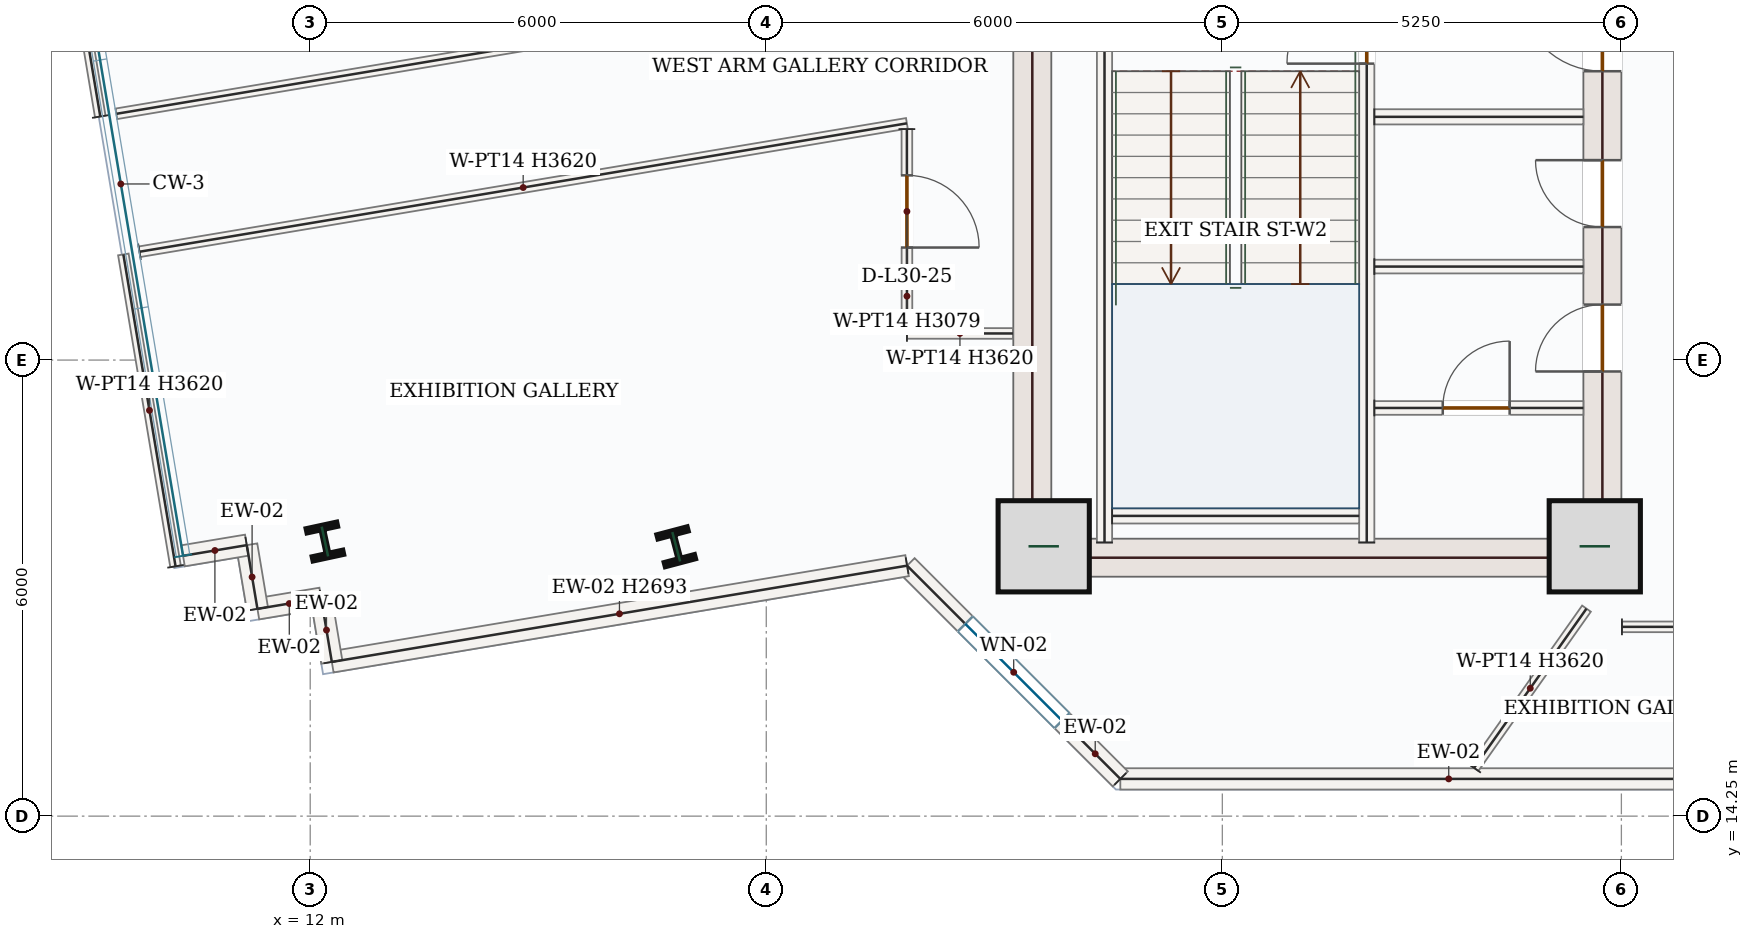
"""IFC4 building model, lengths in metres.
Left out: names, types, materials, properties, quantities, classifications, styles, units other than length and angle.
Written with IfcOpenShell. Run it as: python <this file> out.ifc"""

import sys

from ifc_helpers import new_model, si_unit, direction, frame, frame_2d, origin, origin_2d, place, context, subcontext, project, spatial, rectangle, i_section, extrude, source, transform, mapped, element, fill, save


model = new_model("IFC4")
c1 = context("Model", 3, precision=1e-05, world=origin(), true_north=direction((0.0, 1.0)))
c2 = subcontext(c1, "Body", "Model", "MODEL_VIEW")
j1 = project(units=[si_unit("LENGTHUNIT", "METRE"), si_unit("PLANEANGLEUNIT", "RADIAN")], contexts=[c1])
p1 = place(None, origin())
s1 = spatial("IfcSite", under=j1, at=p1, CompositionType="ELEMENT")
p2 = place(p1, origin())
s2 = spatial("IfcBuilding", under=s1, at=p2, CompositionType="ELEMENT")
p3 = place(p2, frame((0.0, 0.0, 135.6)))
s3 = spatial("IfcBuildingStorey", under=s2, at=p3, CompositionType="ELEMENT", Elevation=135.6)
m1 = source(origin(), c2, "Body", "SweptSolid", [
    extrude(rectangle(XDim=8.55, YDim=0.5, at=frame_2d((4.275, 0.0))), origin(), (0.0, 0.0, 1.0), 3.62),
])
p4 = place(p3, frame((21.5, 17.4, 0.0), z_axis=(0.0, 0.0, 1.0), x_axis=(0.0, 1.0, 0.0)))
e1 = element("IfcWall", 1, at=p4, inside=s3, PredefinedType="SHEAR", context=c2, shape_type="MappedRepresentation", body=[
    mapped(m1, transform((0.0, 0.0, 0.0), x_axis=(1.0, 0.0, 0.0), y_axis=(0.0, 1.0, 0.0), z_axis=(0.0, 0.0, 1.0), scale=1.0)),
])
p5 = place(p3, frame((29.0, 17.4, 0.0), z_axis=(0.0, 0.0, 1.0), x_axis=(0.0, 1.0, 0.0)))
e2 = element("IfcWall", 2, at=p5, inside=s3, PredefinedType="SHEAR", context=c2, shape_type="SweptSolid", body=[
    extrude(rectangle(XDim=8.55, YDim=0.5, at=frame_2d((4.275, 0.0))), origin(), (0.0, 0.0, 1.0), 3.62),
])
p6 = place(p5, frame((6.65, 0.0, 0.0)))
e3 = element("IfcOpeningElement", 3, at=p6, cuts=e2, PredefinedType="OPENING", context=c2, shape_type="SweptSolid", body=[
    extrude(rectangle(XDim=1.1, YDim=2.2, at=frame_2d((0.55, 1.1))), frame((0.0, 0.26, 0.0), z_axis=(0.0, -1.0, 0.0), x_axis=(1.0, 0.0, 0.0)), (0.0, 0.0, 1.0), 0.52),
])
p7 = place(p5, frame((2.7, 0.0, 0.0)))
e4 = element("IfcOpeningElement", 4, at=p7, cuts=e2, PredefinedType="OPENING", context=c2, shape_type="SweptSolid", body=[
    extrude(rectangle(XDim=0.88, YDim=2.1, at=frame_2d((0.44, 1.05))), frame((0.0, 0.26, 0.0), z_axis=(0.0, -1.0, 0.0), x_axis=(1.0, 0.0, 0.0)), (0.0, 0.0, 1.0), 0.52),
])
p8 = place(p5, frame((4.6, 0.0, 0.0)))
e5 = element("IfcOpeningElement", 5, at=p8, cuts=e2, PredefinedType="OPENING", context=c2, shape_type="SweptSolid", body=[
    extrude(rectangle(XDim=0.88, YDim=2.1, at=frame_2d((0.44, 1.05))), frame((0.0, 0.26, 0.0), z_axis=(0.0, -1.0, 0.0), x_axis=(1.0, 0.0, 0.0)), (0.0, 0.0, 1.0), 0.52),
])
m2 = source(origin(), c2, "Body", "SweptSolid", [
    extrude(rectangle(XDim=7.0, YDim=0.5, at=frame_2d((3.5, 0.0))), origin(), (0.0, 0.0, 1.0), 3.62),
])
p9 = place(p3, frame((21.75, 17.65, 0.0), z_axis=(0.0, 0.0, 1.0), x_axis=(1.0, 0.0, 0.0)))
e6 = element("IfcWall", 6, at=p9, inside=s3, PredefinedType="SHEAR", context=c2, shape_type="MappedRepresentation", body=[
    mapped(m2, transform((0.0, 0.0, 0.0), x_axis=(1.0, 0.0, 0.0), y_axis=(0.0, 1.0, 0.0), z_axis=(0.0, 0.0, 1.0), scale=1.0)),
])
m3 = source(origin(), c2, "Body", "SweptSolid", [
    extrude(rectangle(XDim=1.2, YDim=1.2, at=origin_2d()), origin(), (0.0, 0.0, 1.0), 3.9),
])
for number, where, z_axis, x_axis in (
    (7, (21.65, 17.8, 0.0), (0.0, 0.0, 1.0), (1.0, 0.0, 0.0)),
    (8, (28.9, 17.8, 0.0), (0.0, 0.0, 1.0), (1.0, 0.0, 0.0)),
):
    element("IfcColumn", number, at=place(p3, frame(where, z_axis=z_axis, x_axis=x_axis)), inside=s3, PredefinedType="COLUMN", context=c2, shape_type="MappedRepresentation", body=[
        mapped(m3, transform((0.0, 0.0, 0.0), x_axis=(1.0, 0.0, 0.0), y_axis=(0.0, 1.0, 0.0), z_axis=(0.0, 0.0, 1.0), scale=1.0)),
    ])
m4 = source(origin(), c2, "Body", "SweptSolid", [
    extrude(i_section(OverallWidth=0.412, OverallDepth=0.435, WebThickness=0.036, FlangeThickness=0.057, FilletRadius=0.018, at=origin_2d()), origin(), (0.0, 0.0, 1.0), 3.9),
])
for number, where, z_axis, x_axis in (
    (9, (16.815, 17.794, 0.0), (0.0, 0.0, 1.0), (0.967, 0.255, 0.0)),
    (10, (12.193, 17.863, 0.0), (0.0, 0.0, 1.0), (0.977, 0.211, 0.0)),
):
    element("IfcColumn", number, at=place(p3, frame(where, z_axis=z_axis, x_axis=x_axis)), inside=s3, PredefinedType="COLUMN", context=c2, shape_type="MappedRepresentation", body=[
        mapped(m4, transform((0.0, 0.0, 0.0), x_axis=(1.0, 0.0, 0.0), y_axis=(0.0, 1.0, 0.0), z_axis=(0.0, 0.0, 1.0), scale=1.0)),
    ])
m5 = source(origin(), c2, "Body", "SweptSolid", [
    extrude(rectangle(XDim=8.641, YDim=0.28, at=frame_2d((4.321, 0.0))), origin(), (0.0, 0.0, 1.0), 3.62),
])
p10 = place(p3, frame((31.299, 14.74, 0.0), z_axis=(0.0, 0.0, 1.0), x_axis=(-1.0, 0.0, 0.0)))
e11 = element("IfcWall", 11, at=p10, inside=s3, PredefinedType="SOLIDWALL", context=c2, shape_type="MappedRepresentation", body=[
    mapped(m5, transform((0.0, 0.0, 0.0), x_axis=(1.0, 0.0, 0.0), y_axis=(0.0, 1.0, 0.0), z_axis=(0.0, 0.0, 1.0), scale=1.0)),
])
p11 = place(p3, frame((22.658, 14.74, 0.0), z_axis=(0.0, 0.0, 1.0), x_axis=(-0.707076011326, 0.707137549708, 0.0)))
e12 = element("IfcWall", 12, at=p11, inside=s3, PredefinedType="SOLIDWALL", context=c2, shape_type="SweptSolid", body=[
    extrude(rectangle(XDim=3.967, YDim=0.28, at=frame_2d((1.984, 0.0))), origin(), (0.0, 0.0, 1.0), 3.62),
])
p12 = place(p11, frame((1.084, 0.0, 0.85)))
e13 = element("IfcOpeningElement", 13, at=p12, cuts=e12, PredefinedType="OPENING", context=c2, shape_type="SweptSolid", body=[
    extrude(rectangle(XDim=1.8, YDim=1.75, at=frame_2d((0.9, 0.875))), frame((0.0, 0.15, 0.0), z_axis=(0.0, -1.0, 0.0), x_axis=(1.0, 0.0, 0.0)), (0.0, 0.0, 1.0), 0.3),
])
m6 = source(origin(), c2, "Body", "SweptSolid", [
    extrude(rectangle(XDim=7.674, YDim=0.28, at=frame_2d((3.837, 0.0))), origin(), (0.0, 0.0, 1.0), 2.693),
])
p13 = place(p3, frame((19.853, 17.545, 0.0), z_axis=(0.0, 0.0, 1.0), x_axis=(-0.986284504747, -0.165054159886, 0.0)))
e14 = element("IfcWall", 14, at=p13, inside=s3, PredefinedType="SOLIDWALL", context=c2, shape_type="MappedRepresentation", body=[
    mapped(m6, transform((0.0, 0.0, 0.0), x_axis=(1.0, 0.0, 0.0), y_axis=(0.0, 1.0, 0.0), z_axis=(0.0, 0.0, 1.0), scale=1.0)),
])
m7 = source(origin(), c2, "Body", "SweptSolid", [
    extrude(rectangle(XDim=0.85, YDim=0.28, at=frame_2d((0.425, 0.0))), origin(), (0.0, 0.0, 1.0), 3.62),
])
for number, where, z_axis, x_axis in (
    (15, (12.284, 16.279, 0.0), (0.0, 0.0, 1.0), (-0.165, 0.986, 0.0)),
    (16, (12.144, 17.117, 0.0), (0.0, 0.0, 1.0), (-0.986, -0.165, 0.0)),
    (17, (11.306, 16.977, 0.0), (0.0, 0.0, 1.0), (-0.165, 0.986, 0.0)),
    (18, (11.165, 17.815, 0.0), (0.0, 0.0, 1.0), (-0.986, -0.165, 0.0)),
):
    element("IfcWall", number, at=place(p3, frame(where, z_axis=z_axis, x_axis=x_axis)), inside=s3, PredefinedType="SOLIDWALL", context=c2, shape_type="MappedRepresentation", body=[
        mapped(m7, transform((0.0, 0.0, 0.0), x_axis=(1.0, 0.0, 0.0), y_axis=(0.0, 1.0, 0.0), z_axis=(0.0, 0.0, 1.0), scale=1.0)),
    ])
m8 = source(origin(), c2, "Body", "SweptSolid", [
    extrude(rectangle(XDim=7.87, YDim=0.2, at=frame_2d((3.935, 0.0))), origin(), (0.0, 0.0, 1.0), 3.62),
])
p14 = place(p3, frame((22.45, 17.85, 0.0), z_axis=(0.0, 0.0, 1.0), x_axis=(0.0, 1.0, 0.0)))
e19 = element("IfcWall", 19, at=p14, inside=s3, PredefinedType="SOLIDWALL", context=c2, shape_type="MappedRepresentation", body=[
    mapped(m8, transform((0.0, 0.0, 0.0), x_axis=(1.0, 0.0, 0.0), y_axis=(0.0, 1.0, 0.0), z_axis=(0.0, 0.0, 1.0), scale=1.0)),
])
p15 = place(p3, frame((25.9, 17.85, 0.0), z_axis=(0.0, 0.0, 1.0), x_axis=(0.0, 1.0, 0.0)))
e20 = element("IfcWall", 20, at=p15, inside=s3, PredefinedType="SOLIDWALL", context=c2, shape_type="SweptSolid", body=[
    extrude(rectangle(XDim=8.0, YDim=0.2, at=frame_2d((4.0, 0.0))), origin(), (0.0, 0.0, 1.0), 3.62),
])
p16 = place(p15, frame((6.3, 0.0, 0.0)))
e21 = element("IfcOpeningElement", 21, at=p16, cuts=e20, PredefinedType="OPENING", context=c2, shape_type="SweptSolid", body=[
    extrude(rectangle(XDim=1.05, YDim=2.15, at=frame_2d((0.525, 1.075))), frame((0.0, 0.11, 0.0), z_axis=(0.0, -1.0, 0.0), x_axis=(1.0, 0.0, 0.0)), (0.0, 0.0, 1.0), 0.22),
])
m9 = source(origin(), c2, "Body", "SweptSolid", [
    extrude(rectangle(XDim=3.25, YDim=0.2, at=frame_2d((1.625, 0.0))), origin(), (0.0, 0.0, 1.0), 3.62),
])
p17 = place(p3, frame((22.55, 18.2, 0.0), z_axis=(0.0, 0.0, 1.0), x_axis=(1.0, 0.0, 0.0)))
e22 = element("IfcWall", 22, at=p17, inside=s3, PredefinedType="SOLIDWALL", context=c2, shape_type="MappedRepresentation", body=[
    mapped(m9, transform((0.0, 0.0, 0.0), x_axis=(1.0, 0.0, 0.0), y_axis=(0.0, 1.0, 0.0), z_axis=(0.0, 0.0, 1.0), scale=1.0)),
])
m10 = source(origin(), c2, "Body", "SweptSolid", [
    extrude(rectangle(XDim=2.75, YDim=0.2, at=frame_2d((1.375, 0.0))), origin(), (0.0, 0.0, 1.0), 3.62),
])
p18 = place(p3, frame((26.0, 23.45, 0.0), z_axis=(0.0, 0.0, 1.0), x_axis=(1.0, 0.0, 0.0)))
e23 = element("IfcWall", 23, at=p18, inside=s3, PredefinedType="SOLIDWALL", context=c2, shape_type="MappedRepresentation", body=[
    mapped(m10, transform((0.0, 0.0, 0.0), x_axis=(1.0, 0.0, 0.0), y_axis=(0.0, 1.0, 0.0), z_axis=(0.0, 0.0, 1.0), scale=1.0)),
])
p19 = place(p3, frame((26.0, 19.62, 0.0), z_axis=(0.0, 0.0, 1.0), x_axis=(1.0, 0.0, 0.0)))
e24 = element("IfcWall", 24, at=p19, inside=s3, PredefinedType="PARTITIONING", context=c2, shape_type="SweptSolid", body=[
    extrude(rectangle(XDim=2.75, YDim=0.18, at=frame_2d((1.375, 0.0))), origin(), (0.0, 0.0, 1.0), 3.62),
])
p20 = place(p19, frame((0.9, 0.0, 0.0)))
e25 = element("IfcOpeningElement", 25, at=p20, cuts=e24, PredefinedType="OPENING", context=c2, shape_type="SweptSolid", body=[
    extrude(rectangle(XDim=0.88, YDim=2.1, at=frame_2d((0.44, 1.05))), frame((0.0, 0.1, 0.0), z_axis=(0.0, -1.0, 0.0), x_axis=(1.0, 0.0, 0.0)), (0.0, 0.0, 1.0), 0.2),
])
m11 = source(origin(), c2, "Body", "SweptSolid", [
    extrude(rectangle(XDim=2.75, YDim=0.18, at=frame_2d((1.375, 0.0))), origin(), (0.0, 0.0, 1.0), 3.62),
])
p21 = place(p3, frame((26.0, 21.48, 0.0), z_axis=(0.0, 0.0, 1.0), x_axis=(1.0, 0.0, 0.0)))
e26 = element("IfcWall", 26, at=p21, inside=s3, PredefinedType="PARTITIONING", context=c2, shape_type="MappedRepresentation", body=[
    mapped(m11, transform((0.0, 0.0, 0.0), x_axis=(1.0, 0.0, 0.0), y_axis=(0.0, 1.0, 0.0), z_axis=(0.0, 0.0, 1.0), scale=1.0)),
])
p22 = place(p3, frame((29.258, 16.74, 0.0), z_axis=(0.0, 0.0, 1.0), x_axis=(0.999999999474, -3.2436991e-05, 0.0)))
e27 = element("IfcWall", 27, at=p22, inside=s3, PredefinedType="PARTITIONING", context=c2, shape_type="SweptSolid", body=[
    extrude(rectangle(XDim=7.527, YDim=0.14, at=frame_2d((3.763, 0.0))), origin(), (0.0, 0.0, 1.0), 3.62),
])
p23 = place(p22, frame((5.13, 0.0, 0.0)))
e28 = element("IfcOpeningElement", 28, at=p23, cuts=e27, PredefinedType="OPENING", context=c2, shape_type="SweptSolid", body=[
    extrude(rectangle(XDim=0.95, YDim=2.15, at=frame_2d((0.475, 1.075))), frame((0.0, 0.08, 0.0), z_axis=(0.0, -1.0, 0.0), x_axis=(1.0, 0.0, 0.0)), (0.0, 0.0, 1.0), 0.16),
])
m12 = source(origin(), c2, "Body", "SweptSolid", [
    extrude(rectangle(XDim=2.565, YDim=0.14, at=frame_2d((1.282, 0.0))), origin(), (0.0, 0.0, 1.0), 3.62),
])
p24 = place(p3, frame((27.311, 14.885, 0.0), z_axis=(0.0, 0.0, 1.0), x_axis=(0.576926084836, 0.816796359343, 0.0)))
e29 = element("IfcWall", 29, at=p24, inside=s3, PredefinedType="PARTITIONING", context=c2, shape_type="MappedRepresentation", body=[
    mapped(m12, transform((0.0, 0.0, 0.0), x_axis=(1.0, 0.0, 0.0), y_axis=(0.0, 1.0, 0.0), z_axis=(0.0, 0.0, 1.0), scale=1.0)),
])
m13 = source(origin(), c2, "Body", "SweptSolid", [
    extrude(rectangle(XDim=10.544, YDim=0.14, at=frame_2d((5.272, 0.0))), origin(), (0.0, 0.0, 1.0), 3.62),
])
p25 = place(p3, frame((19.85, 25.23, 0.0), z_axis=(0.0, 0.0, 1.0), x_axis=(-0.986287336963, -0.165037235031, 0.0)))
e30 = element("IfcWall", 30, at=p25, inside=s3, PredefinedType="PARTITIONING", context=c2, shape_type="MappedRepresentation", body=[
    mapped(m13, transform((0.0, 0.0, 0.0), x_axis=(1.0, 0.0, 0.0), y_axis=(0.0, 1.0, 0.0), z_axis=(0.0, 0.0, 1.0), scale=1.0)),
])
m14 = source(origin(), c2, "Body", "SweptSolid", [
    extrude(rectangle(XDim=4.16, YDim=0.14, at=frame_2d((2.08, 0.0))), origin(), (0.0, 0.0, 1.0), 3.62),
])
for number, where, z_axis, x_axis in (
    (31, (9.238, 23.454, 0.0), (0.0, 0.0, 1.0), (-0.165, 0.986, 0.0)),
    (32, (10.229, 17.537, 0.0), (0.0, 0.0, 1.0), (-0.165, 0.986, 0.0)),
):
    element("IfcWall", number, at=place(p3, frame(where, z_axis=z_axis, x_axis=x_axis)), inside=s3, PredefinedType="PARTITIONING", context=c2, shape_type="MappedRepresentation", body=[
        mapped(m14, transform((0.0, 0.0, 0.0), x_axis=(1.0, 0.0, 0.0), y_axis=(0.0, 1.0, 0.0), z_axis=(0.0, 0.0, 1.0), scale=1.0)),
    ])
m15 = source(origin(), c2, "Body", "SweptSolid", [
    extrude(rectangle(XDim=10.237, YDim=0.14, at=frame_2d((5.118, 0.0))), origin(), (0.0, 0.0, 1.0), 3.62),
])
p26 = place(p3, frame((9.754, 21.675, 0.0), z_axis=(0.0, 0.0, 1.0), x_axis=(0.986290594835, 0.165017764319, 0.0)))
e33 = element("IfcWall", 33, at=p26, inside=s3, PredefinedType="PARTITIONING", context=c2, shape_type="MappedRepresentation", body=[
    mapped(m15, transform((0.0, 0.0, 0.0), x_axis=(1.0, 0.0, 0.0), y_axis=(0.0, 1.0, 0.0), z_axis=(0.0, 0.0, 1.0), scale=1.0)),
])
p27 = place(p3, frame((19.85, 23.289, 0.0), z_axis=(0.0, 0.0, 1.0), x_axis=(0.000363372069, -0.99999993398, 0.0)))
e34 = element("IfcWall", 34, at=p27, inside=s3, PredefinedType="PARTITIONING", context=c2, shape_type="SweptSolid", body=[
    extrude(rectangle(XDim=2.688, YDim=0.14, at=frame_2d((1.344, 0.0))), origin(), (0.0, 0.0, 1.0), 3.079),
])
p28 = place(p27, frame((0.608, 0.0, 0.0)))
e35 = element("IfcOpeningElement", 35, at=p28, cuts=e34, PredefinedType="OPENING", context=c2, shape_type="SweptSolid", body=[
    extrude(rectangle(XDim=0.95, YDim=2.15, at=frame_2d((0.475, 1.075))), frame((0.0, 0.08, 0.0), z_axis=(0.0, -1.0, 0.0), x_axis=(1.0, 0.0, 0.0)), (0.0, 0.0, 1.0), 0.16),
])
m16 = source(origin(), c2, "Body", "SweptSolid", [
    extrude(rectangle(XDim=1.394, YDim=0.14, at=frame_2d((0.697, 0.0))), origin(), (0.0, 0.0, 1.0), 3.62),
])
p29 = place(p3, frame((19.851, 20.601, 0.0), z_axis=(0.0, 0.0, 1.0), x_axis=(0.999999754632, -0.000700525222, 0.0)))
e36 = element("IfcWall", 36, at=p29, inside=s3, PredefinedType="PARTITIONING", context=c2, shape_type="MappedRepresentation", body=[
    mapped(m16, transform((0.0, 0.0, 0.0), x_axis=(1.0, 0.0, 0.0), y_axis=(0.0, 1.0, 0.0), z_axis=(0.0, 0.0, 1.0), scale=1.0)),
])
m17 = source(origin(), c2, "Body", "SweptSolid", [
    extrude(rectangle(XDim=1.8, YDim=1.75, at=frame_2d((0.9, 0.875))), frame((0.0, 0.03, 0.0), z_axis=(0.0, -1.0, 0.0), x_axis=(1.0, 0.0, 0.0)), (0.0, 0.0, 1.0), 0.06),
])
p30 = place(p12, origin())
e37 = element("IfcWindow", 37, at=p30, inside=s3, PartitioningType="DOUBLE_PANEL_VERTICAL", PredefinedType="WINDOW", context=c2, shape_type="MappedRepresentation", body=[
    mapped(m17, transform((0.0, 0.0, 0.0), x_axis=(1.0, 0.0, 0.0), y_axis=(0.0, 1.0, 0.0), z_axis=(0.0, 0.0, 1.0), scale=1.0)),
])
fill(e13, e37)
m18 = source(origin(), c2, "Body", "SweptSolid", [
    extrude(rectangle(XDim=1.05, YDim=2.15, at=frame_2d((0.525, 1.075))), frame((0.0, 0.025, 0.0), z_axis=(0.0, -1.0, 0.0), x_axis=(1.0, 0.0, 0.0)), (0.0, 0.0, 1.0), 0.05),
])
p31 = place(p16, origin())
e38 = element("IfcDoor", 38, at=p31, inside=s3, OperationType="SINGLE_SWING_LEFT", PredefinedType="DOOR", context=c2, shape_type="MappedRepresentation", body=[
    mapped(m18, transform((0.0, 0.0, 0.0), x_axis=(1.0, 0.0, 0.0), y_axis=(0.0, 1.0, 0.0), z_axis=(0.0, 0.0, 1.0), scale=1.0)),
])
fill(e21, e38)
m19 = source(origin(), c2, "Body", "SweptSolid", [
    extrude(rectangle(XDim=1.1, YDim=2.2, at=frame_2d((0.55, 1.1))), frame((0.0, 0.025, 0.0), z_axis=(0.0, -1.0, 0.0), x_axis=(1.0, 0.0, 0.0)), (0.0, 0.0, 1.0), 0.05),
])
p32 = place(p6, origin())
e39 = element("IfcDoor", 39, at=p32, inside=s3, OperationType="SINGLE_SWING_RIGHT", PredefinedType="DOOR", context=c2, shape_type="MappedRepresentation", body=[
    mapped(m19, transform((0.0, 0.0, 0.0), x_axis=(1.0, 0.0, 0.0), y_axis=(0.0, 1.0, 0.0), z_axis=(0.0, 0.0, 1.0), scale=1.0)),
])
fill(e3, e39)
m20 = source(origin(), c2, "Body", "SweptSolid", [
    extrude(rectangle(XDim=0.88, YDim=2.1, at=frame_2d((0.44, 1.05))), frame((0.0, 0.025, 0.0), z_axis=(0.0, -1.0, 0.0), x_axis=(1.0, 0.0, 0.0)), (0.0, 0.0, 1.0), 0.05),
])
p33 = place(p20, origin())
e40 = element("IfcDoor", 40, at=p33, inside=s3, OperationType="SINGLE_SWING_RIGHT", PredefinedType="DOOR", context=c2, shape_type="MappedRepresentation", body=[
    mapped(m20, transform((0.0, 0.0, 0.0), x_axis=(1.0, 0.0, 0.0), y_axis=(0.0, 1.0, 0.0), z_axis=(0.0, 0.0, 1.0), scale=1.0)),
])
fill(e25, e40)
p34 = place(p7, origin())
e41 = element("IfcDoor", 41, at=p34, inside=s3, OperationType="SINGLE_SWING_LEFT", PredefinedType="DOOR", context=c2, shape_type="MappedRepresentation", body=[
    mapped(m20, transform((0.0, 0.0, 0.0), x_axis=(1.0, 0.0, 0.0), y_axis=(0.0, 1.0, 0.0), z_axis=(0.0, 0.0, 1.0), scale=1.0)),
])
fill(e4, e41)
p35 = place(p8, origin())
e42 = element("IfcDoor", 42, at=p35, inside=s3, OperationType="SINGLE_SWING_RIGHT", PredefinedType="DOOR", context=c2, shape_type="MappedRepresentation", body=[
    mapped(m20, transform((0.0, 0.0, 0.0), x_axis=(1.0, 0.0, 0.0), y_axis=(0.0, 1.0, 0.0), z_axis=(0.0, 0.0, 1.0), scale=1.0)),
])
fill(e5, e42)
m21 = source(origin(), c2, "Body", "SweptSolid", [
    extrude(rectangle(XDim=0.95, YDim=2.15, at=frame_2d((0.475, 1.075))), frame((0.0, 0.025, 0.0), z_axis=(0.0, -1.0, 0.0), x_axis=(1.0, 0.0, 0.0)), (0.0, 0.0, 1.0), 0.05),
])
p36 = place(p28, origin())
e43 = element("IfcDoor", 43, at=p36, inside=s3, OperationType="SINGLE_SWING_RIGHT", PredefinedType="DOOR", context=c2, shape_type="MappedRepresentation", body=[
    mapped(m21, transform((0.0, 0.0, 0.0), x_axis=(1.0, 0.0, 0.0), y_axis=(0.0, 1.0, 0.0), z_axis=(0.0, 0.0, 1.0), scale=1.0)),
])
fill(e35, e43)
save(model, sys.argv[1])
